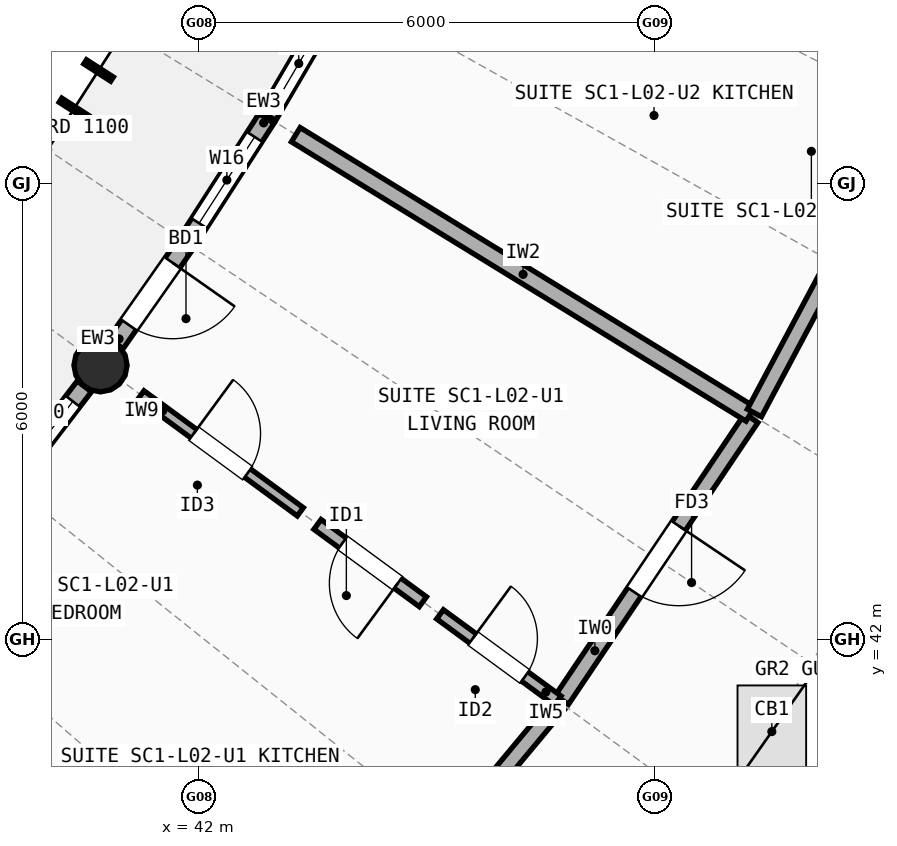
"""IFC4 building model, lengths in metres.
Left out: names, types, materials, properties, quantities, classifications, styles, units other than length and angle.
Written with IfcOpenShell. Run it as: python <this file> out.ifc"""

import sys

from ifc_helpers import new_model, si_unit, direction, frame, frame_2d, origin, origin_2d, place, context, subcontext, project, spatial, rectangle, circle, extrude, element, fill, save


model = new_model("IFC4")
c1 = context("Model", 3, precision=1e-05, world=origin(), true_north=direction((0.0, 1.0)))
c2 = subcontext(c1, "Body", "Model", "MODEL_VIEW")
j1 = project(units=[si_unit("LENGTHUNIT", "METRE"), si_unit("PLANEANGLEUNIT", "RADIAN")], contexts=[c1])
p1 = place(None, origin())
s1 = spatial("IfcSite", under=j1, at=p1, CompositionType="ELEMENT")
p2 = place(p1, origin())
s2 = spatial("IfcBuilding", under=s1, at=p2, CompositionType="ELEMENT")
p3 = place(p2, frame((0.0, 0.0, 7.7)))
s3 = spatial("IfcBuildingStorey", under=s2, at=p3, CompositionType="ELEMENT", Elevation=7.7)
p4 = place(p3, frame((40.704, 45.61, 0.0), z_axis=(0.0, 0.0, 1.0), x_axis=(1.0, 0.0, 0.0)))
e1 = element("IfcColumn", 1, at=p4, inside=s3, PredefinedType="COLUMN", context=c2, shape_type="SweptSolid", body=[
    extrude(circle(Radius=0.35, at=origin_2d()), origin(), (0.0, 0.0, 1.0), 2.948),
])
p5 = place(p3, frame((39.521, 44.064, 0.0), z_axis=(0.0, 0.0, 1.0), x_axis=(0.607921045706, 0.793997482482, 0.0)))
e2 = element("IfcWall", 2, at=p5, inside=s3, PredefinedType="STANDARD", context=c2, shape_type="SweptSolid", body=[
    extrude(rectangle(XDim=1.597, YDim=0.235, at=frame_2d((0.798, 0.0))), origin(), (0.0, 0.0, 1.0), 2.684),
])
p6 = place(p5, frame((0.248, 0.0, 0.85)))
e3 = element("IfcOpeningElement", 3, at=p6, cuts=e2, PredefinedType="OPENING", context=c2, shape_type="SweptSolid", body=[
    extrude(rectangle(XDim=1.1, YDim=1.45, at=frame_2d((0.55, 0.725))), frame((0.0, 0.127, 0.0), z_axis=(0.0, -1.0, 0.0), x_axis=(1.0, 0.0, 0.0)), (0.0, 0.0, 1.0), 0.255),
])
p7 = place(p3, frame((40.905, 45.896, 0.0), z_axis=(0.0, 0.0, 1.0), x_axis=(0.574754617893, 0.818325808716, 0.0)))
e4 = element("IfcWall", 4, at=p7, inside=s3, PredefinedType="STANDARD", context=c2, shape_type="SweptSolid", body=[
    extrude(rectangle(XDim=1.597, YDim=0.235, at=frame_2d((0.798, 0.0))), origin(), (0.0, 0.0, 1.0), 2.684),
])
p8 = place(p7, frame((0.298, 0.0, 0.0)))
e5 = element("IfcOpeningElement", 5, at=p8, cuts=e4, PredefinedType="OPENING", context=c2, shape_type="SweptSolid", body=[
    extrude(rectangle(XDim=1.0, YDim=2.15, at=frame_2d((0.5, 1.075))), frame((0.0, 0.127, 0.0), z_axis=(0.0, -1.0, 0.0), x_axis=(1.0, 0.0, 0.0)), (0.0, 0.0, 1.0), 0.255),
])
p9 = place(p3, frame((41.845, 47.236, 0.0), z_axis=(0.0, 0.0, 1.0), x_axis=(0.540911277163, 0.841079657486, 0.0)))
e6 = element("IfcWall", 6, at=p9, inside=s3, PredefinedType="STANDARD", context=c2, shape_type="SweptSolid", body=[
    extrude(rectangle(XDim=1.927, YDim=0.235, at=frame_2d((0.963, 0.0))), origin(), (0.0, 0.0, 1.0), 2.684),
])
p10 = place(p9, frame((0.288, 0.0, 0.85)))
e7 = element("IfcOpeningElement", 7, at=p10, cuts=e6, PredefinedType="OPENING", context=c2, shape_type="SweptSolid", body=[
    extrude(rectangle(XDim=1.35, YDim=1.5, at=frame_2d((0.675, 0.75))), frame((0.0, 0.127, 0.0), z_axis=(0.0, -1.0, 0.0), x_axis=(1.0, 0.0, 0.0)), (0.0, 0.0, 1.0), 0.255),
])
p11 = place(p3, frame((42.908, 48.891, 0.0), z_axis=(0.0, 0.0, 1.0), x_axis=(0.505970625323, 0.862550709414, 0.0)))
e8 = element("IfcWall", 8, at=p11, inside=s3, PredefinedType="STANDARD", context=c2, shape_type="SweptSolid", body=[
    extrude(rectangle(XDim=1.597, YDim=0.235, at=frame_2d((0.798, 0.0))), origin(), (0.0, 0.0, 1.0), 2.684),
])
p12 = place(p11, frame((0.198, 0.0, 0.85)))
e9 = element("IfcOpeningElement", 9, at=p12, cuts=e8, PredefinedType="OPENING", context=c2, shape_type="SweptSolid", body=[
    extrude(rectangle(XDim=1.2, YDim=1.35, at=frame_2d((0.6, 0.675))), frame((0.0, 0.127, 0.0), z_axis=(0.0, -1.0, 0.0), x_axis=(1.0, 0.0, 0.0)), (0.0, 0.0, 1.0), 0.255),
])
p13 = place(p3, frame((42.414, 35.965, 0.0), z_axis=(0.0, 0.0, 1.0), x_axis=(0.639849364326, 0.768500351966, 0.0)))
e10 = element("IfcWall", 10, at=p13, inside=s3, PredefinedType="SOLIDWALL", context=c2, shape_type="SweptSolid", body=[
    extrude(rectangle(XDim=6.739, YDim=0.21, at=frame_2d((3.369, 0.0))), origin(), (0.0, 0.0, 1.0), 2.722),
])
p14 = place(p3, frame((46.774, 41.207, 0.0), z_axis=(0.0, 0.0, 1.0), x_axis=(0.55793724224, 0.829883144619, 0.0)))
e11 = element("IfcWall", 11, at=p14, inside=s3, PredefinedType="SOLIDWALL", context=c2, shape_type="SweptSolid", body=[
    extrude(rectangle(XDim=4.467, YDim=0.21, at=frame_2d((2.234, 0.0))), origin(), (0.0, 0.0, 1.0), 2.762),
])
p15 = place(p14, frame((1.708, 0.0, 0.0)))
e12 = element("IfcOpeningElement", 12, at=p15, cuts=e11, PredefinedType="OPENING", context=c2, shape_type="SweptSolid", body=[
    extrude(rectangle(XDim=1.05, YDim=2.15, at=frame_2d((0.525, 1.075))), frame((0.0, 0.115, 0.0), z_axis=(0.0, -1.0, 0.0), x_axis=(1.0, 0.0, 0.0)), (0.0, 0.0, 1.0), 0.23),
])
p16 = place(p3, frame((41.236, 45.219, 0.0), z_axis=(0.0, 0.0, 1.0), x_axis=(0.806321400299, -0.591477640676, 0.0)))
e13 = element("IfcWall", 13, at=p16, inside=s3, PredefinedType="PARTITIONING", context=c2, shape_type="SweptSolid", body=[
    extrude(rectangle(XDim=2.6, YDim=0.135, at=frame_2d((1.3, 0.0))), origin(), (0.0, 0.0, 1.0), 2.742),
])
p17 = place(p16, frame((0.86, 0.0, 0.0)))
e14 = element("IfcOpeningElement", 14, at=p17, cuts=e13, PredefinedType="OPENING", context=c2, shape_type="SweptSolid", body=[
    extrude(rectangle(XDim=0.88, YDim=2.1, at=frame_2d((0.44, 1.05))), frame((0.0, 0.077, 0.0), z_axis=(0.0, -1.0, 0.0), x_axis=(1.0, 0.0, 0.0)), (0.0, 0.0, 1.0), 0.155),
])
p18 = place(p3, frame((43.559, 43.516, 0.0), z_axis=(0.0, 0.0, 1.0), x_axis=(0.806292157387, -0.591517503491, 0.0)))
e15 = element("IfcWall", 15, at=p18, inside=s3, PredefinedType="PLUMBINGWALL", context=c2, shape_type="SweptSolid", body=[
    extrude(rectangle(XDim=1.72, YDim=0.16, at=frame_2d((0.86, 0.0))), origin(), (0.0, 0.0, 1.0), 2.742),
])
p19 = place(p18, frame((0.41, 0.0, 0.0)))
e16 = element("IfcOpeningElement", 16, at=p19, cuts=e15, PredefinedType="OPENING", context=c2, shape_type="SweptSolid", body=[
    extrude(rectangle(XDim=0.9, YDim=2.1, at=frame_2d((0.45, 1.05))), frame((0.0, 0.09, 0.0), z_axis=(0.0, -1.0, 0.0), x_axis=(1.0, 0.0, 0.0)), (0.0, 0.0, 1.0), 0.18),
])
p20 = place(p3, frame((45.171, 42.333, 0.0), z_axis=(0.0, 0.0, 1.0), x_axis=(0.806348393053, -0.591440841522, 0.0)))
e17 = element("IfcWall", 17, at=p20, inside=s3, PredefinedType="PARTITIONING", context=c2, shape_type="SweptSolid", body=[
    extrude(rectangle(XDim=1.92, YDim=0.15, at=frame_2d((0.96, 0.0))), origin(), (0.0, 0.0, 1.0), 2.742),
])
p21 = place(p20, frame((0.535, 0.0, 0.0)))
e18 = element("IfcOpeningElement", 18, at=p21, cuts=e17, PredefinedType="OPENING", context=c2, shape_type="SweptSolid", body=[
    extrude(rectangle(XDim=0.85, YDim=2.1, at=frame_2d((0.425, 1.05))), frame((0.0, 0.085, 0.0), z_axis=(0.0, -1.0, 0.0), x_axis=(1.0, 0.0, 0.0)), (0.0, 0.0, 1.0), 0.17),
])
p22 = place(p3, frame((43.273, 48.643, 0.0), z_axis=(0.0, 0.0, 1.0), x_axis=(0.852035433886, -0.523484115713, 0.0)))
e19 = element("IfcWall", 19, at=p22, inside=s3, PredefinedType="SOLIDWALL", context=c2, shape_type="SweptSolid", body=[
    extrude(rectangle(XDim=7.02, YDim=0.22, at=frame_2d((3.51, 0.0))), origin(), (0.0, 0.0, 1.0), 2.722),
])
p23 = place(p3, frame((49.307, 44.983, 0.0), z_axis=(0.0, 0.0, 1.0), x_axis=(0.47013685006, 0.88259353171, 0.0)))
e20 = element("IfcWall", 20, at=p23, inside=s3, PredefinedType="SOLIDWALL", context=c2, shape_type="SweptSolid", body=[
    extrude(rectangle(XDim=6.738, YDim=0.21, at=frame_2d((3.369, 0.0))), origin(), (0.0, 0.0, 1.0), 2.742),
])
p24 = place(p6, origin())
e21 = element("IfcWindow", 21, at=p24, inside=s3, PartitioningType="SINGLE_PANEL", PredefinedType="WINDOW", context=c2, shape_type="SweptSolid", body=[
    extrude(rectangle(XDim=1.1, YDim=1.45, at=frame_2d((0.55, 0.725))), frame((0.0, 0.03, 0.0), z_axis=(0.0, -1.0, 0.0), x_axis=(1.0, 0.0, 0.0)), (0.0, 0.0, 1.0), 0.06),
])
fill(e3, e21)
p25 = place(p8, origin())
e22 = element("IfcDoor", 22, at=p25, inside=s3, OperationType="SINGLE_SWING_RIGHT", PredefinedType="DOOR", context=c2, shape_type="SweptSolid", body=[
    extrude(rectangle(XDim=1.0, YDim=2.15, at=frame_2d((0.5, 1.075))), frame((0.0, 0.025, 0.0), z_axis=(0.0, -1.0, 0.0), x_axis=(1.0, 0.0, 0.0)), (0.0, 0.0, 1.0), 0.05),
])
fill(e5, e22)
p26 = place(p10, origin())
e23 = element("IfcWindow", 23, at=p26, inside=s3, PartitioningType="SINGLE_PANEL", PredefinedType="WINDOW", context=c2, shape_type="SweptSolid", body=[
    extrude(rectangle(XDim=1.35, YDim=1.5, at=frame_2d((0.675, 0.75))), frame((0.0, 0.03, 0.0), z_axis=(0.0, -1.0, 0.0), x_axis=(1.0, 0.0, 0.0)), (0.0, 0.0, 1.0), 0.06),
])
fill(e7, e23)
p27 = place(p12, origin())
e24 = element("IfcWindow", 24, at=p27, inside=s3, PartitioningType="SINGLE_PANEL", PredefinedType="WINDOW", context=c2, shape_type="SweptSolid", body=[
    extrude(rectangle(XDim=1.2, YDim=1.35, at=frame_2d((0.6, 0.675))), frame((0.0, 0.03, 0.0), z_axis=(0.0, -1.0, 0.0), x_axis=(1.0, 0.0, 0.0)), (0.0, 0.0, 1.0), 0.06),
])
fill(e9, e24)
p28 = place(p15, origin())
e25 = element("IfcDoor", 25, at=p28, inside=s3, OperationType="SINGLE_SWING_RIGHT", PredefinedType="DOOR", context=c2, shape_type="SweptSolid", body=[
    extrude(rectangle(XDim=1.05, YDim=2.15, at=frame_2d((0.525, 1.075))), frame((0.0, 0.025, 0.0), z_axis=(0.0, -1.0, 0.0), x_axis=(1.0, 0.0, 0.0)), (0.0, 0.0, 1.0), 0.05),
])
fill(e12, e25)
p29 = place(p17, origin())
e26 = element("IfcDoor", 26, at=p29, inside=s3, OperationType="SINGLE_SWING_LEFT", PredefinedType="DOOR", context=c2, shape_type="SweptSolid", body=[
    extrude(rectangle(XDim=0.88, YDim=2.1, at=frame_2d((0.44, 1.05))), frame((0.0, 0.025, 0.0), z_axis=(0.0, -1.0, 0.0), x_axis=(1.0, 0.0, 0.0)), (0.0, 0.0, 1.0), 0.05),
])
fill(e14, e26)
p30 = place(p19, origin())
e27 = element("IfcDoor", 27, at=p30, inside=s3, OperationType="SINGLE_SWING_RIGHT", PredefinedType="DOOR", context=c2, shape_type="SweptSolid", body=[
    extrude(rectangle(XDim=0.9, YDim=2.1, at=frame_2d((0.45, 1.05))), frame((0.0, 0.025, 0.0), z_axis=(0.0, -1.0, 0.0), x_axis=(1.0, 0.0, 0.0)), (0.0, 0.0, 1.0), 0.05),
])
fill(e16, e27)
p31 = place(p21, origin())
e28 = element("IfcDoor", 28, at=p31, inside=s3, OperationType="SINGLE_SWING_LEFT", PredefinedType="DOOR", context=c2, shape_type="SweptSolid", body=[
    extrude(rectangle(XDim=0.85, YDim=2.1, at=frame_2d((0.425, 1.05))), frame((0.0, 0.025, 0.0), z_axis=(0.0, -1.0, 0.0), x_axis=(1.0, 0.0, 0.0)), (0.0, 0.0, 1.0), 0.05),
])
fill(e18, e28)
save(model, sys.argv[1])
